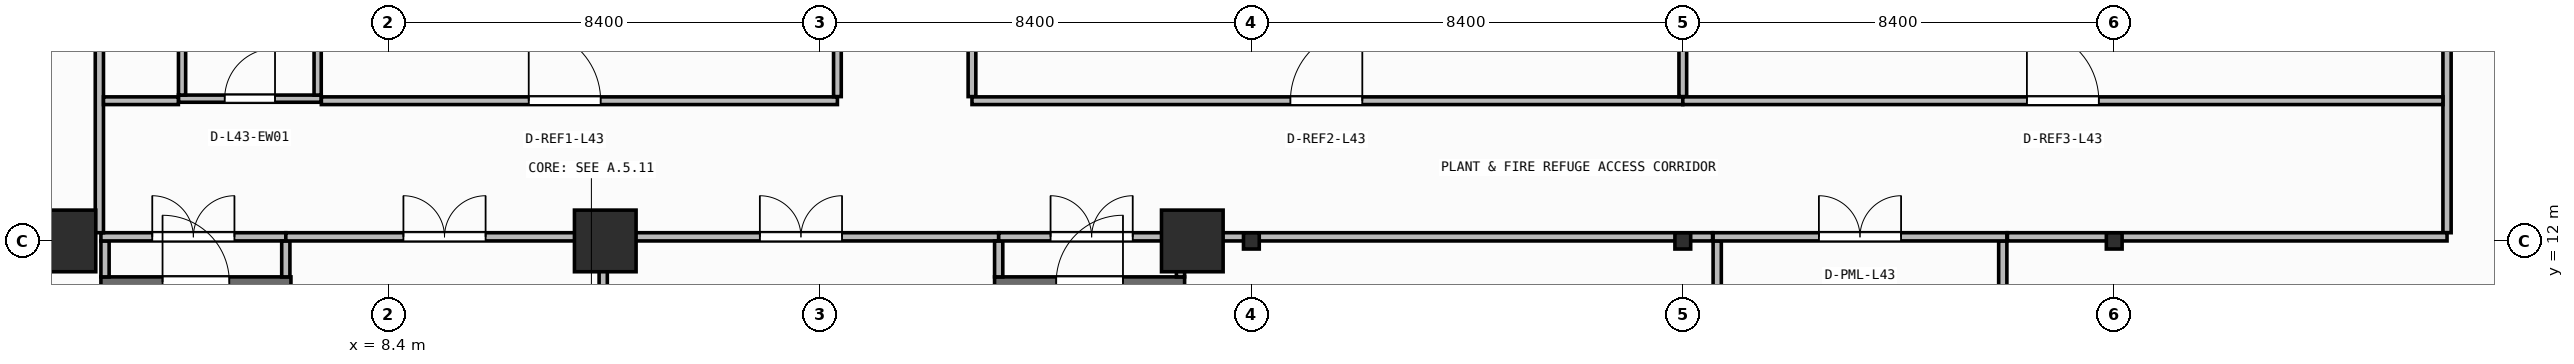
"""IFC4 building model, lengths in metres.
Left out: names, types, materials, properties, quantities, classifications, styles, units other than length and angle.
Written with IfcOpenShell. Run it as: python <this file> out.ifc"""

import sys

from ifc_helpers import new_model, si_unit, direction, frame, frame_2d, origin, origin_2d, place, context, subcontext, project, spatial, rectangle, i_section, extrude, element, fill, save


model = new_model("IFC4")
c1 = context("Model", 3, precision=1e-05, world=origin(), true_north=direction((0.0, 1.0)))
c2 = subcontext(c1, "Body", "Model", "MODEL_VIEW")
j1 = project(units=[si_unit("LENGTHUNIT", "METRE"), si_unit("PLANEANGLEUNIT", "RADIAN")], contexts=[c1])
p1 = place(None, origin())
s1 = spatial("IfcSite", under=j1, at=p1, CompositionType="ELEMENT")
p2 = place(p1, origin())
s2 = spatial("IfcBuilding", under=s1, at=p2, CompositionType="ELEMENT")
p3 = place(p2, frame((0.0, 0.0, 174.45)))
s3 = spatial("IfcBuildingStorey", under=s2, at=p3, CompositionType="ELEMENT", Elevation=174.45)
for number, where, z_axis, x_axis in (
    (1, (2.1, 12.0, 0.0), (0.0, 0.0, 1.0), (1.0, 0.0, 0.0)),
    (2, (12.62, 12.0, 0.0), (0.0, 0.0, 1.0), (1.0, 0.0, 0.0)),
    (3, (24.05, 12.0, 0.0), (0.0, 0.0, 1.0), (1.0, 0.0, 0.0)),
):
    element("IfcColumn", number, at=place(p3, frame(where, z_axis=z_axis, x_axis=x_axis)), inside=s3, PredefinedType="COLUMN", context=c2, shape_type="SweptSolid", body=[
        extrude(rectangle(XDim=1.2, YDim=1.2, at=origin_2d()), origin(), (0.0, 0.0, 1.0), 5.8),
    ])
for number, where, z_axis, x_axis in (
    (4, (25.2, 12.0, 0.0), (0.0, 0.0, 1.0), (1.0, 0.0, 0.0)),
    (5, (33.6, 12.0, 0.0), (0.0, 0.0, 1.0), (1.0, 0.0, 0.0)),
    (6, (42.0, 12.0, 0.0), (0.0, 0.0, 1.0), (1.0, 0.0, 0.0)),
):
    element("IfcColumn", number, at=place(p3, frame(where, z_axis=z_axis, x_axis=x_axis)), inside=s3, PredefinedType="COLUMN", context=c2, shape_type="SweptSolid", body=[
        extrude(i_section(OverallWidth=0.307, OverallDepth=0.315, WebThickness=0.012, FlangeThickness=0.019, FilletRadius=0.017, at=origin_2d()), origin(), (0.0, 0.0, 1.0), 5.8),
    ])
p4 = place(p3, frame((2.8, 11.2, 0.0), z_axis=(0.0, 0.0, 1.0), x_axis=(1.0, 0.0, 0.0)))
e7 = element("IfcWall", 7, at=p4, inside=s3, PredefinedType="SHEAR", context=c2, shape_type="SweptSolid", body=[
    extrude(rectangle(XDim=3.7, YDim=0.2, at=frame_2d((1.85, 0.0))), origin(), (0.0, 0.0, 1.0), 5.56),
])
p5 = place(p4, frame((1.2, 0.0, 0.0)))
e8 = element("IfcOpeningElement", 8, at=p5, cuts=e7, PredefinedType="OPENING", context=c2, shape_type="SweptSolid", body=[
    extrude(rectangle(XDim=1.3, YDim=2.15, at=frame_2d((0.65, 1.075))), frame((0.0, 0.11, 0.0), z_axis=(0.0, -1.0, 0.0), x_axis=(1.0, 0.0, 0.0)), (0.0, 0.0, 1.0), 0.22),
])
p6 = place(p3, frame((20.2, 11.2, 0.0), z_axis=(0.0, 0.0, 1.0), x_axis=(1.0, 0.0, 0.0)))
e9 = element("IfcWall", 9, at=p6, inside=s3, PredefinedType="SHEAR", context=c2, shape_type="SweptSolid", body=[
    extrude(rectangle(XDim=3.7, YDim=0.2, at=frame_2d((1.85, 0.0))), origin(), (0.0, 0.0, 1.0), 5.56),
])
p7 = place(p6, frame((1.2, 0.0, 0.0)))
e10 = element("IfcOpeningElement", 10, at=p7, cuts=e9, PredefinedType="OPENING", context=c2, shape_type="SweptSolid", body=[
    extrude(rectangle(XDim=1.3, YDim=2.15, at=frame_2d((0.65, 1.075))), frame((0.0, 0.11, 0.0), z_axis=(0.0, -1.0, 0.0), x_axis=(1.0, 0.0, 0.0)), (0.0, 0.0, 1.0), 0.22),
])
p8 = place(p3, frame((2.88, 11.3, 0.0), z_axis=(0.0, 0.0, 1.0), x_axis=(0.0, 1.0, 0.0)))
e11 = element("IfcWall", 11, at=p8, inside=s3, PredefinedType="PARTITIONING", context=c2, shape_type="SweptSolid", body=[
    extrude(rectangle(XDim=0.7, YDim=0.16, at=frame_2d((0.35, 0.0))), origin(), (0.0, 0.0, 1.0), 5.56),
])
p9 = place(p3, frame((2.8, 12.08, 0.0), z_axis=(0.0, 0.0, 1.0), x_axis=(1.0, 0.0, 0.0)))
e12 = element("IfcWall", 12, at=p9, inside=s3, PredefinedType="PARTITIONING", context=c2, shape_type="SweptSolid", body=[
    extrude(rectangle(XDim=3.6, YDim=0.16, at=frame_2d((1.8, 0.0))), origin(), (0.0, 0.0, 1.0), 4.835),
])
p10 = place(p9, frame((1.0, 0.0, 0.0)))
e13 = element("IfcOpeningElement", 13, at=p10, cuts=e12, PredefinedType="OPENING", context=c2, shape_type="SweptSolid", body=[
    extrude(rectangle(XDim=1.6, YDim=2.05, at=frame_2d((0.8, 1.025))), frame((0.0, 0.09, 0.0), z_axis=(0.0, -1.0, 0.0), x_axis=(1.0, 0.0, 0.0)), (0.0, 0.0, 1.0), 0.18),
])
p11 = place(p3, frame((6.4, 11.3, 0.0), z_axis=(0.0, 0.0, 1.0), x_axis=(0.0, 1.0, 0.0)))
e14 = element("IfcWall", 14, at=p11, inside=s3, PredefinedType="PARTITIONING", context=c2, shape_type="SweptSolid", body=[
    extrude(rectangle(XDim=0.7, YDim=0.16, at=frame_2d((0.35, 0.0))), origin(), (0.0, 0.0, 1.0), 5.56),
])
p12 = place(p3, frame((6.4, 12.08, 0.0), z_axis=(0.0, 0.0, 1.0), x_axis=(1.0, 0.0, 0.0)))
e15 = element("IfcWall", 15, at=p12, inside=s3, PredefinedType="PARTITIONING", context=c2, shape_type="SweptSolid", body=[
    extrude(rectangle(XDim=6.18, YDim=0.16, at=frame_2d((3.09, 0.0))), origin(), (0.0, 0.0, 1.0), 4.835),
])
p13 = place(p12, frame((2.29, 0.0, 0.0)))
e16 = element("IfcOpeningElement", 16, at=p13, cuts=e15, PredefinedType="OPENING", context=c2, shape_type="SweptSolid", body=[
    extrude(rectangle(XDim=1.6, YDim=2.05, at=frame_2d((0.8, 1.025))), frame((0.0, 0.09, 0.0), z_axis=(0.0, -1.0, 0.0), x_axis=(1.0, 0.0, 0.0)), (0.0, 0.0, 1.0), 0.18),
])
p14 = place(p3, frame((12.58, 9.21, 0.0), z_axis=(0.0, 0.0, 1.0), x_axis=(0.0, 1.0, 0.0)))
e17 = element("IfcWall", 17, at=p14, inside=s3, PredefinedType="PARTITIONING", context=c2, shape_type="SweptSolid", body=[
    extrude(rectangle(XDim=2.79, YDim=0.16, at=frame_2d((1.395, 0.0))), origin(), (0.0, 0.0, 1.0), 5.56),
])
p15 = place(p3, frame((12.58, 12.08, 0.0), z_axis=(0.0, 0.0, 1.0), x_axis=(1.0, 0.0, 0.0)))
e18 = element("IfcWall", 18, at=p15, inside=s3, PredefinedType="PARTITIONING", context=c2, shape_type="SweptSolid", body=[
    extrude(rectangle(XDim=7.7, YDim=0.16, at=frame_2d((3.85, 0.0))), origin(), (0.0, 0.0, 1.0), 4.835),
])
p16 = place(p15, frame((3.05, 0.0, 0.0)))
e19 = element("IfcOpeningElement", 19, at=p16, cuts=e18, PredefinedType="OPENING", context=c2, shape_type="SweptSolid", body=[
    extrude(rectangle(XDim=1.6, YDim=2.05, at=frame_2d((0.8, 1.025))), frame((0.0, 0.09, 0.0), z_axis=(0.0, -1.0, 0.0), x_axis=(1.0, 0.0, 0.0)), (0.0, 0.0, 1.0), 0.18),
])
p17 = place(p3, frame((20.28, 11.3, 0.0), z_axis=(0.0, 0.0, 1.0), x_axis=(0.0, 1.0, 0.0)))
e20 = element("IfcWall", 20, at=p17, inside=s3, PredefinedType="PARTITIONING", context=c2, shape_type="SweptSolid", body=[
    extrude(rectangle(XDim=0.7, YDim=0.16, at=frame_2d((0.35, 0.0))), origin(), (0.0, 0.0, 1.0), 5.56),
])
p18 = place(p3, frame((20.28, 12.08, 0.0), z_axis=(0.0, 0.0, 1.0), x_axis=(1.0, 0.0, 0.0)))
e21 = element("IfcWall", 21, at=p18, inside=s3, PredefinedType="PARTITIONING", context=c2, shape_type="SweptSolid", body=[
    extrude(rectangle(XDim=3.62, YDim=0.16, at=frame_2d((1.81, 0.0))), origin(), (0.0, 0.0, 1.0), 4.835),
])
p19 = place(p18, frame((1.01, 0.0, 0.0)))
e22 = element("IfcOpeningElement", 22, at=p19, cuts=e21, PredefinedType="OPENING", context=c2, shape_type="SweptSolid", body=[
    extrude(rectangle(XDim=1.6, YDim=2.05, at=frame_2d((0.8, 1.025))), frame((0.0, 0.09, 0.0), z_axis=(0.0, -1.0, 0.0), x_axis=(1.0, 0.0, 0.0)), (0.0, 0.0, 1.0), 0.18),
])
p20 = place(p3, frame((23.82, 11.3, 0.0), z_axis=(0.0, 0.0, 1.0), x_axis=(0.0, 1.0, 0.0)))
e23 = element("IfcWall", 23, at=p20, inside=s3, PredefinedType="PARTITIONING", context=c2, shape_type="SweptSolid", body=[
    extrude(rectangle(XDim=0.7, YDim=0.16, at=frame_2d((0.35, 0.0))), origin(), (0.0, 0.0, 1.0), 5.56),
])
for number, where, z_axis, x_axis in (
    (24, (34.27, 8.61, 0.0), (0.0, 0.0, 1.0), (0.0, 1.0, 0.0)),
    (25, (39.83, 8.61, 0.0), (0.0, 0.0, 1.0), (0.0, 1.0, 0.0)),
):
    element("IfcWall", number, at=place(p3, frame(where, z_axis=z_axis, x_axis=x_axis)), inside=s3, PredefinedType="PARTITIONING", context=c2, shape_type="SweptSolid", body=[
        extrude(rectangle(XDim=3.39, YDim=0.16, at=frame_2d((1.695, 0.0))), origin(), (0.0, 0.0, 1.0), 5.56),
    ])
p21 = place(p3, frame((34.19, 12.08, 0.0), z_axis=(0.0, 0.0, 1.0), x_axis=(1.0, 0.0, 0.0)))
e26 = element("IfcWall", 26, at=p21, inside=s3, PredefinedType="PARTITIONING", context=c2, shape_type="SweptSolid", body=[
    extrude(rectangle(XDim=5.72, YDim=0.16, at=frame_2d((2.86, 0.0))), origin(), (0.0, 0.0, 1.0), 4.835),
])
p22 = place(p21, frame((2.06, 0.0, 0.0)))
e27 = element("IfcOpeningElement", 27, at=p22, cuts=e26, PredefinedType="OPENING", context=c2, shape_type="SweptSolid", body=[
    extrude(rectangle(XDim=1.6, YDim=2.05, at=frame_2d((0.8, 1.025))), frame((0.0, 0.09, 0.0), z_axis=(0.0, -1.0, 0.0), x_axis=(1.0, 0.0, 0.0)), (0.0, 0.0, 1.0), 0.18),
])
p23 = place(p3, frame((4.31, 14.77, 0.0), z_axis=(0.0, 0.0, 1.0), x_axis=(1.0, 0.0, 0.0)))
e28 = element("IfcWall", 28, at=p23, inside=s3, PredefinedType="PARTITIONING", context=c2, shape_type="SweptSolid", body=[
    extrude(rectangle(XDim=2.78, YDim=0.14, at=frame_2d((1.39, 0.0))), origin(), (0.0, 0.0, 1.0), 5.56),
])
p24 = place(p23, frame((0.9, 0.0, 0.0)))
e29 = element("IfcOpeningElement", 29, at=p24, cuts=e28, PredefinedType="OPENING", context=c2, shape_type="SweptSolid", body=[
    extrude(rectangle(XDim=0.98, YDim=2.1, at=frame_2d((0.49, 1.05))), frame((0.0, 0.08, 0.0), z_axis=(0.0, -1.0, 0.0), x_axis=(1.0, 0.0, 0.0)), (0.0, 0.0, 1.0), 0.16),
])
for number, where, z_axis, x_axis in (
    (30, (4.38, 14.84, 0.0), (0.0, 0.0, 1.0), (0.0, 1.0, 0.0)),
    (31, (7.02, 14.84, 0.0), (0.0, 0.0, 1.0), (0.0, 1.0, 0.0)),
):
    element("IfcWall", number, at=place(p3, frame(where, z_axis=z_axis, x_axis=x_axis)), inside=s3, PredefinedType="PARTITIONING", context=c2, shape_type="SweptSolid", body=[
        extrude(rectangle(XDim=2.2, YDim=0.14, at=frame_2d((1.1, 0.0))), origin(), (0.0, 0.0, 1.0), 5.56),
    ])
p25 = place(p3, frame((2.77, 12.16, 0.0), z_axis=(0.0, 0.0, 1.0), x_axis=(0.0, 1.0, 0.0)))
e32 = element("IfcWall", 32, at=p25, inside=s3, PredefinedType="PARTITIONING", context=c2, shape_type="SweptSolid", body=[
    extrude(rectangle(XDim=16.04, YDim=0.16, at=frame_2d((8.02, 0.0))), origin(), (0.0, 0.0, 1.0), 5.56),
])
p26 = place(p3, frame((48.48, 12.16, 0.0), z_axis=(0.0, 0.0, 1.0), x_axis=(0.0, 1.0, 0.0)))
e33 = element("IfcWall", 33, at=p26, inside=s3, PredefinedType="PARTITIONING", context=c2, shape_type="SweptSolid", body=[
    extrude(rectangle(XDim=6.44, YDim=0.16, at=frame_2d((3.22, 0.0))), origin(), (0.0, 0.0, 1.0), 5.56),
])
p27 = place(p3, frame((23.92, 12.08, 0.0), z_axis=(0.0, 0.0, 1.0), x_axis=(1.0, 0.0, 0.0)))
e34 = element("IfcWall", 34, at=p27, inside=s3, PredefinedType="PARTITIONING", context=c2, shape_type="SweptSolid", body=[
    extrude(rectangle(XDim=10.26, YDim=0.16, at=frame_2d((5.13, 0.0))), origin(), (0.0, 0.0, 1.0), 4.835),
])
p28 = place(p3, frame((39.92, 12.08, 0.0), z_axis=(0.0, 0.0, 1.0), x_axis=(1.0, 0.0, 0.0)))
e35 = element("IfcWall", 35, at=p28, inside=s3, PredefinedType="PARTITIONING", context=c2, shape_type="SweptSolid", body=[
    extrude(rectangle(XDim=8.56, YDim=0.16, at=frame_2d((4.28, 0.0))), origin(), (0.0, 0.0, 1.0), 4.835),
])
p29 = place(p3, frame((2.85, 14.73, 0.0), z_axis=(0.0, 0.0, 1.0), x_axis=(1.0, 0.0, 0.0)))
e36 = element("IfcWall", 36, at=p29, inside=s3, PredefinedType="PARTITIONING", context=c2, shape_type="SweptSolid", body=[
    extrude(rectangle(XDim=1.458, YDim=0.15, at=frame_2d((0.729, 0.0))), origin(), (0.0, 0.0, 1.0), 5.56),
])
p30 = place(p3, frame((7.092, 14.73, 0.0), z_axis=(0.0, 0.0, 1.0), x_axis=(1.0, 0.0, 0.0)))
e37 = element("IfcWall", 37, at=p30, inside=s3, PredefinedType="PARTITIONING", context=c2, shape_type="SweptSolid", body=[
    extrude(rectangle(XDim=10.048, YDim=0.15, at=frame_2d((5.024, 0.0))), origin(), (0.0, 0.0, 1.0), 5.56),
])
p31 = place(p30, frame((4.038, 0.0, 0.0)))
e38 = element("IfcOpeningElement", 38, at=p31, cuts=e37, PredefinedType="OPENING", context=c2, shape_type="SweptSolid", body=[
    extrude(rectangle(XDim=1.4, YDim=2.15, at=frame_2d((0.7, 1.075))), frame((0.0, 0.085, 0.0), z_axis=(0.0, -1.0, 0.0), x_axis=(1.0, 0.0, 0.0)), (0.0, 0.0, 1.0), 0.17),
])
for number, where, z_axis, x_axis in (
    (39, (17.14, 14.81, 0.0), (0.0, 0.0, 1.0), (0.0, 1.0, 0.0)),
    (40, (19.76, 14.81, 0.0), (0.0, 0.0, 1.0), (0.0, 1.0, 0.0)),
):
    element("IfcWall", number, at=place(p3, frame(where, z_axis=z_axis, x_axis=x_axis)), inside=s3, PredefinedType="PARTITIONING", context=c2, shape_type="SweptSolid", body=[
        extrude(rectangle(XDim=3.79, YDim=0.15, at=frame_2d((1.895, 0.0))), origin(), (0.0, 0.0, 1.0), 5.56),
    ])
p32 = place(p3, frame((19.76, 14.73, 0.0), z_axis=(0.0, 0.0, 1.0), x_axis=(1.0, 0.0, 0.0)))
e41 = element("IfcWall", 41, at=p32, inside=s3, PredefinedType="PARTITIONING", context=c2, shape_type="SweptSolid", body=[
    extrude(rectangle(XDim=13.84, YDim=0.15, at=frame_2d((6.92, 0.0))), origin(), (0.0, 0.0, 1.0), 5.56),
])
p33 = place(p32, frame((6.2, 0.0, 0.0)))
e42 = element("IfcOpeningElement", 42, at=p33, cuts=e41, PredefinedType="OPENING", context=c2, shape_type="SweptSolid", body=[
    extrude(rectangle(XDim=1.4, YDim=2.15, at=frame_2d((0.7, 1.075))), frame((0.0, 0.085, 0.0), z_axis=(0.0, -1.0, 0.0), x_axis=(1.0, 0.0, 0.0)), (0.0, 0.0, 1.0), 0.17),
])
p34 = place(p3, frame((33.6, 14.81, 0.0), z_axis=(0.0, 0.0, 1.0), x_axis=(0.0, 1.0, 0.0)))
e43 = element("IfcWall", 43, at=p34, inside=s3, PredefinedType="PARTITIONING", context=c2, shape_type="SweptSolid", body=[
    extrude(rectangle(XDim=3.79, YDim=0.15, at=frame_2d((1.895, 0.0))), origin(), (0.0, 0.0, 1.0), 4.325),
])
p35 = place(p3, frame((33.6, 14.73, 0.0), z_axis=(0.0, 0.0, 1.0), x_axis=(1.0, 0.0, 0.0)))
e44 = element("IfcWall", 44, at=p35, inside=s3, PredefinedType="PARTITIONING", context=c2, shape_type="SweptSolid", body=[
    extrude(rectangle(XDim=14.8, YDim=0.15, at=frame_2d((7.4, 0.0))), origin(), (0.0, 0.0, 1.0), 5.56),
])
p36 = place(p35, frame((6.7, 0.0, 0.0)))
e45 = element("IfcOpeningElement", 45, at=p36, cuts=e44, PredefinedType="OPENING", context=c2, shape_type="SweptSolid", body=[
    extrude(rectangle(XDim=1.4, YDim=2.15, at=frame_2d((0.7, 1.075))), frame((0.0, 0.085, 0.0), z_axis=(0.0, -1.0, 0.0), x_axis=(1.0, 0.0, 0.0)), (0.0, 0.0, 1.0), 0.17),
])
p37 = place(p5, origin())
e46 = element("IfcDoor", 46, at=p37, inside=s3, OperationType="SINGLE_SWING_LEFT", PredefinedType="DOOR", context=c2, shape_type="SweptSolid", body=[
    extrude(rectangle(XDim=1.3, YDim=2.15, at=frame_2d((0.65, 1.075))), frame((0.0, 0.025, 0.0), z_axis=(0.0, -1.0, 0.0), x_axis=(1.0, 0.0, 0.0)), (0.0, 0.0, 1.0), 0.05),
])
fill(e8, e46)
p38 = place(p7, origin())
e47 = element("IfcDoor", 47, at=p38, inside=s3, OperationType="SINGLE_SWING_RIGHT", PredefinedType="DOOR", context=c2, shape_type="SweptSolid", body=[
    extrude(rectangle(XDim=1.3, YDim=2.15, at=frame_2d((0.65, 1.075))), frame((0.0, 0.025, 0.0), z_axis=(0.0, -1.0, 0.0), x_axis=(1.0, 0.0, 0.0)), (0.0, 0.0, 1.0), 0.05),
])
fill(e10, e47)
p39 = place(p10, origin())
e48 = element("IfcDoor", 48, at=p39, inside=s3, OperationType="DOUBLE_DOOR_SINGLE_SWING", PredefinedType="DOOR", context=c2, shape_type="SweptSolid", body=[
    extrude(rectangle(XDim=1.6, YDim=2.05, at=frame_2d((0.8, 1.025))), frame((0.0, 0.025, 0.0), z_axis=(0.0, -1.0, 0.0), x_axis=(1.0, 0.0, 0.0)), (0.0, 0.0, 1.0), 0.05),
])
fill(e13, e48)
p40 = place(p13, origin())
e49 = element("IfcDoor", 49, at=p40, inside=s3, OperationType="DOUBLE_DOOR_SINGLE_SWING", PredefinedType="DOOR", context=c2, shape_type="SweptSolid", body=[
    extrude(rectangle(XDim=1.6, YDim=2.05, at=frame_2d((0.8, 1.025))), frame((0.0, 0.025, 0.0), z_axis=(0.0, -1.0, 0.0), x_axis=(1.0, 0.0, 0.0)), (0.0, 0.0, 1.0), 0.05),
])
fill(e16, e49)
p41 = place(p16, origin())
e50 = element("IfcDoor", 50, at=p41, inside=s3, OperationType="DOUBLE_DOOR_SINGLE_SWING", PredefinedType="DOOR", context=c2, shape_type="SweptSolid", body=[
    extrude(rectangle(XDim=1.6, YDim=2.05, at=frame_2d((0.8, 1.025))), frame((0.0, 0.025, 0.0), z_axis=(0.0, -1.0, 0.0), x_axis=(1.0, 0.0, 0.0)), (0.0, 0.0, 1.0), 0.05),
])
fill(e19, e50)
p42 = place(p19, origin())
e51 = element("IfcDoor", 51, at=p42, inside=s3, OperationType="DOUBLE_DOOR_SINGLE_SWING", PredefinedType="DOOR", context=c2, shape_type="SweptSolid", body=[
    extrude(rectangle(XDim=1.6, YDim=2.05, at=frame_2d((0.8, 1.025))), frame((0.0, 0.025, 0.0), z_axis=(0.0, -1.0, 0.0), x_axis=(1.0, 0.0, 0.0)), (0.0, 0.0, 1.0), 0.05),
])
fill(e22, e51)
p43 = place(p22, origin())
e52 = element("IfcDoor", 52, at=p43, inside=s3, OperationType="DOUBLE_DOOR_SINGLE_SWING", PredefinedType="DOOR", context=c2, shape_type="SweptSolid", body=[
    extrude(rectangle(XDim=1.6, YDim=2.05, at=frame_2d((0.8, 1.025))), frame((0.0, 0.025, 0.0), z_axis=(0.0, -1.0, 0.0), x_axis=(1.0, 0.0, 0.0)), (0.0, 0.0, 1.0), 0.05),
])
fill(e27, e52)
p44 = place(p24, origin())
e53 = element("IfcDoor", 53, at=p44, inside=s3, OperationType="SINGLE_SWING_RIGHT", PredefinedType="DOOR", context=c2, shape_type="SweptSolid", body=[
    extrude(rectangle(XDim=0.98, YDim=2.1, at=frame_2d((0.49, 1.05))), frame((0.0, 0.025, 0.0), z_axis=(0.0, -1.0, 0.0), x_axis=(1.0, 0.0, 0.0)), (0.0, 0.0, 1.0), 0.05),
])
fill(e29, e53)
p45 = place(p31, origin())
e54 = element("IfcDoor", 54, at=p45, inside=s3, OperationType="SINGLE_SWING_LEFT", PredefinedType="DOOR", context=c2, shape_type="SweptSolid", body=[
    extrude(rectangle(XDim=1.4, YDim=2.15, at=frame_2d((0.7, 1.075))), frame((0.0, 0.025, 0.0), z_axis=(0.0, -1.0, 0.0), x_axis=(1.0, 0.0, 0.0)), (0.0, 0.0, 1.0), 0.05),
])
fill(e38, e54)
p46 = place(p33, origin())
e55 = element("IfcDoor", 55, at=p46, inside=s3, OperationType="SINGLE_SWING_RIGHT", PredefinedType="DOOR", context=c2, shape_type="SweptSolid", body=[
    extrude(rectangle(XDim=1.4, YDim=2.15, at=frame_2d((0.7, 1.075))), frame((0.0, 0.025, 0.0), z_axis=(0.0, -1.0, 0.0), x_axis=(1.0, 0.0, 0.0)), (0.0, 0.0, 1.0), 0.05),
])
fill(e42, e55)
p47 = place(p36, origin())
e56 = element("IfcDoor", 56, at=p47, inside=s3, OperationType="SINGLE_SWING_LEFT", PredefinedType="DOOR", context=c2, shape_type="SweptSolid", body=[
    extrude(rectangle(XDim=1.4, YDim=2.15, at=frame_2d((0.7, 1.075))), frame((0.0, 0.025, 0.0), z_axis=(0.0, -1.0, 0.0), x_axis=(1.0, 0.0, 0.0)), (0.0, 0.0, 1.0), 0.05),
])
fill(e45, e56)
save(model, sys.argv[1])
